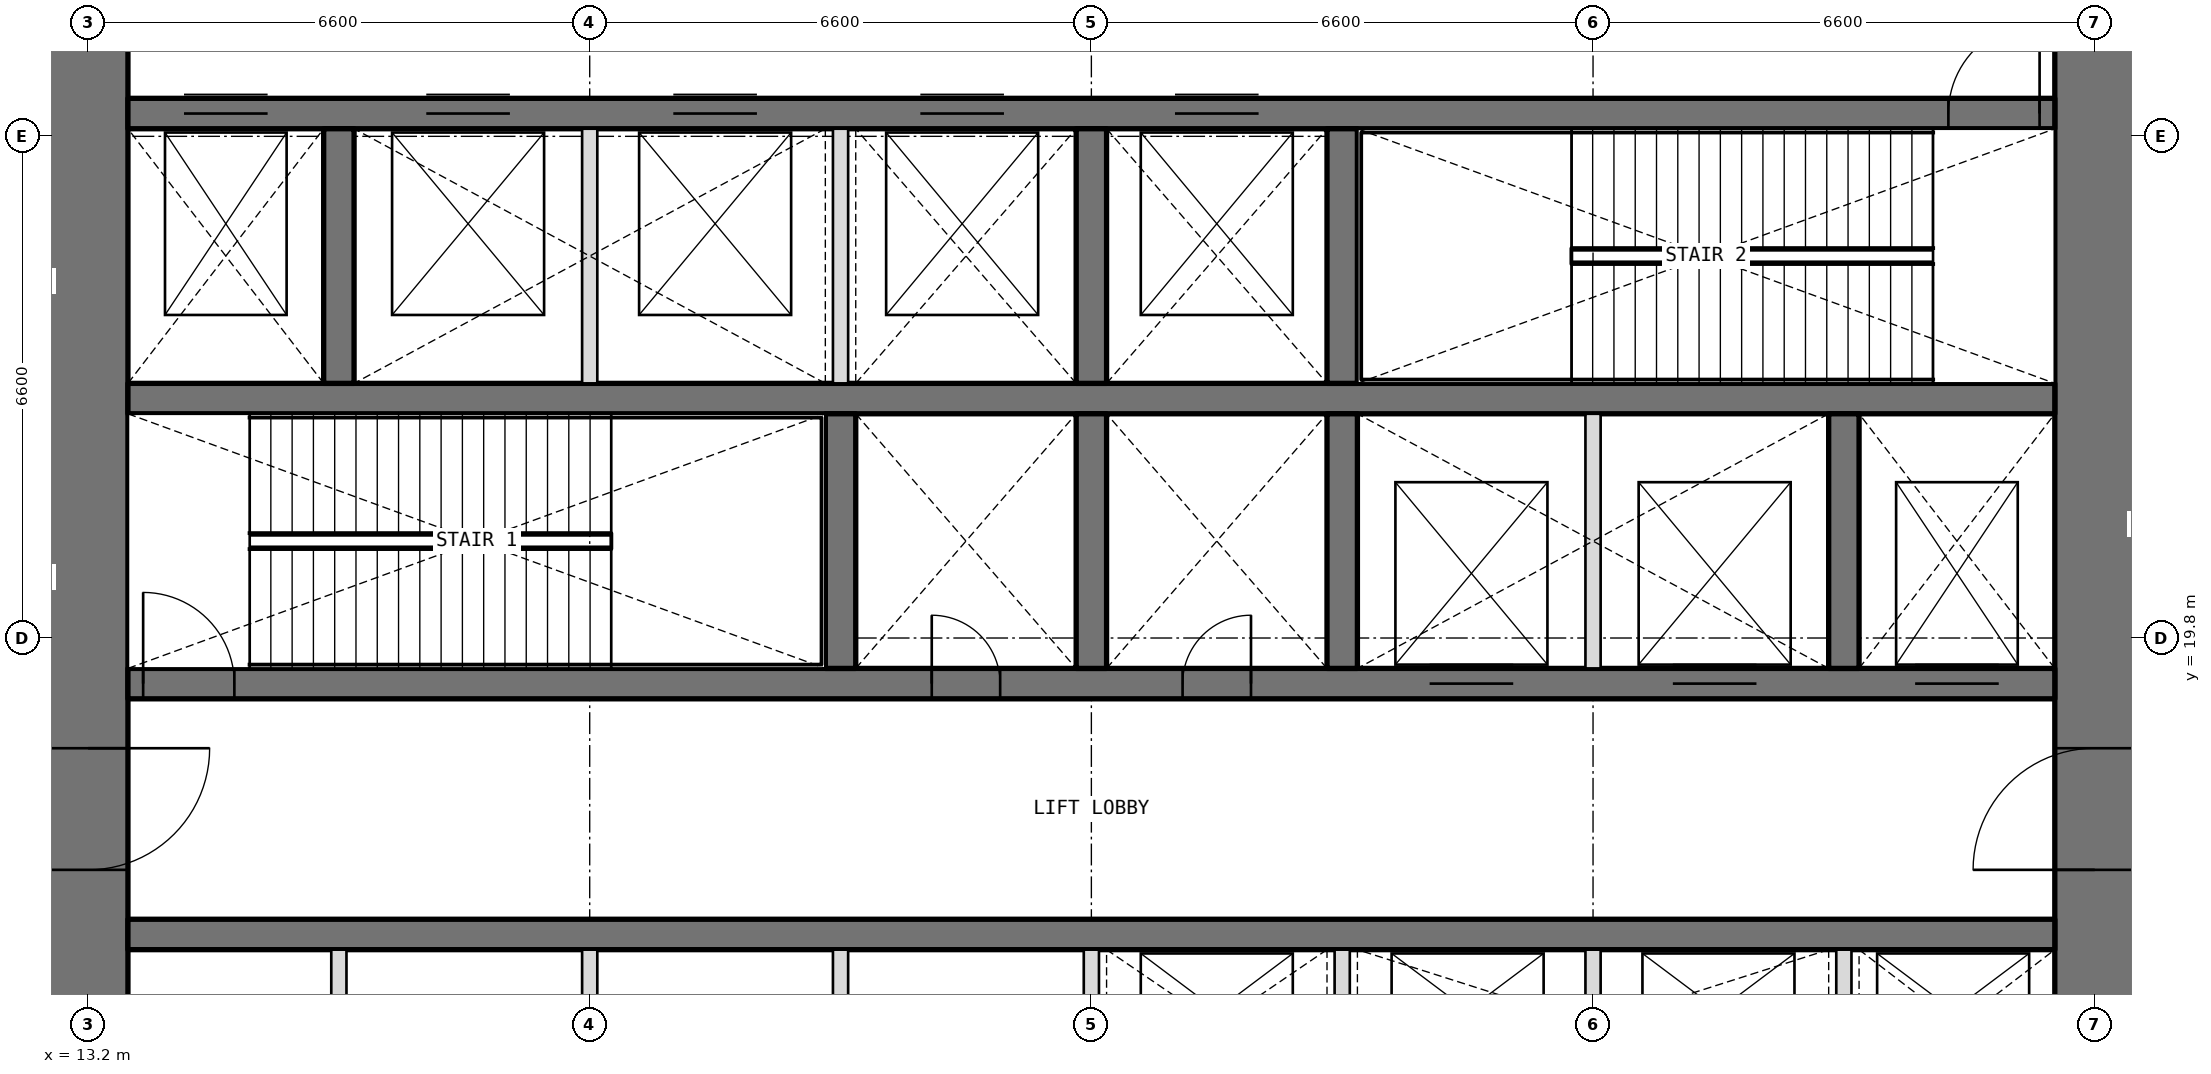
"""IFC4 building model, lengths in metres.
Left out: names, types, materials, properties, quantities, classifications, styles, units other than length and angle.
Written with IfcOpenShell. Run it as: python <this file> out.ifc"""

import sys

from ifc_helpers import new_model, si_unit, direction, frame, frame_2d, origin, place, context, subcontext, project, spatial, rectangle, extrude, element, fill, save


model = new_model("IFC4")
c1 = context("Model", 3, precision=1e-05, world=origin(), true_north=direction((0.0, 1.0)))
c2 = subcontext(c1, "Body", "Model", "MODEL_VIEW")
j1 = project(units=[si_unit("LENGTHUNIT", "METRE"), si_unit("PLANEANGLEUNIT", "RADIAN")], contexts=[c1])
p1 = place(None, origin())
s1 = spatial("IfcSite", under=j1, at=p1, CompositionType="ELEMENT")
p2 = place(p1, origin())
s2 = spatial("IfcBuilding", under=s1, at=p2, CompositionType="ELEMENT")
p3 = place(p2, frame((0.0, 0.0, 75.9)))
s3 = spatial("IfcBuildingStorey", under=s2, at=p3, CompositionType="ELEMENT", Elevation=75.9)
p4 = place(p3, frame((39.6, 13.725, 0.0), z_axis=(0.0, 0.0, 1.0), x_axis=(0.0, 1.0, 0.0)))
e1 = element("IfcWall", 1, at=p4, inside=s3, PredefinedType="SHEAR", context=c2, shape_type="SweptSolid", body=[
    extrude(rectangle(XDim=18.75, YDim=1.05, at=frame_2d((9.375, 0.0))), origin(), (0.0, 0.0, 1.0), 6.3),
])
p5 = place(p4, frame((3.025, 0.0, 0.0)))
e2 = element("IfcOpeningElement", 2, at=p5, cuts=e1, PredefinedType="OPENING", context=c2, shape_type="SweptSolid", body=[
    extrude(rectangle(XDim=1.6, YDim=2.1, at=frame_2d((0.8, 1.05))), frame((0.0, 0.535, 0.0), z_axis=(0.0, -1.0, 0.0), x_axis=(1.0, 0.0, 0.0)), (0.0, 0.0, 1.0), 1.07),
])
p6 = place(p4, frame((13.825, 0.0, 0.0)))
e3 = element("IfcOpeningElement", 3, at=p6, cuts=e1, PredefinedType="OPENING", context=c2, shape_type="SweptSolid", body=[
    extrude(rectangle(XDim=1.6, YDim=2.1, at=frame_2d((0.8, 1.05))), frame((0.0, 0.535, 0.0), z_axis=(0.0, -1.0, 0.0), x_axis=(1.0, 0.0, 0.0)), (0.0, 0.0, 1.0), 1.07),
])
p7 = place(p3, frame((13.2, 32.475, 0.0), z_axis=(0.0, 0.0, 1.0), x_axis=(0.0, -1.0, 0.0)))
e4 = element("IfcWall", 4, at=p7, inside=s3, PredefinedType="SHEAR", context=c2, shape_type="SweptSolid", body=[
    extrude(rectangle(XDim=18.75, YDim=1.05, at=frame_2d((9.375, 0.0))), origin(), (0.0, 0.0, 1.0), 6.3),
])
p8 = place(p7, frame((14.125, 0.0, 0.0)))
e5 = element("IfcOpeningElement", 5, at=p8, cuts=e4, PredefinedType="OPENING", context=c2, shape_type="SweptSolid", body=[
    extrude(rectangle(XDim=1.6, YDim=2.1, at=frame_2d((0.8, 1.05))), frame((0.0, 0.535, 0.0), z_axis=(0.0, -1.0, 0.0), x_axis=(1.0, 0.0, 0.0)), (0.0, 0.0, 1.0), 1.07),
])
p9 = place(p7, frame((3.325, 0.0, 0.0)))
e6 = element("IfcOpeningElement", 6, at=p9, cuts=e4, PredefinedType="OPENING", context=c2, shape_type="SweptSolid", body=[
    extrude(rectangle(XDim=1.6, YDim=2.1, at=frame_2d((0.8, 1.05))), frame((0.0, 0.535, 0.0), z_axis=(0.0, -1.0, 0.0), x_axis=(1.0, 0.0, 0.0)), (0.0, 0.0, 1.0), 1.07),
])
p10 = place(p3, frame((13.725, 15.9, 0.0), z_axis=(0.0, 0.0, 1.0), x_axis=(1.0, 0.0, 0.0)))
e7 = element("IfcWall", 7, at=p10, inside=s3, PredefinedType="SHEAR", context=c2, shape_type="SweptSolid", body=[
    extrude(rectangle(XDim=25.35, YDim=0.4, at=frame_2d((12.675, 0.0))), origin(), (0.0, 0.0, 1.0), 6.3),
])
p11 = place(p3, frame((13.725, 19.2, 0.0), z_axis=(0.0, 0.0, 1.0), x_axis=(1.0, 0.0, 0.0)))
e8 = element("IfcWall", 8, at=p11, inside=s3, PredefinedType="SHEAR", context=c2, shape_type="SweptSolid", body=[
    extrude(rectangle(XDim=25.35, YDim=0.4, at=frame_2d((12.675, 0.0))), origin(), (0.0, 0.0, 1.0), 6.3),
])
p12 = place(p11, frame((10.575, 0.0, 0.0)))
e9 = element("IfcOpeningElement", 9, at=p12, cuts=e8, PredefinedType="OPENING", context=c2, shape_type="SweptSolid", body=[
    extrude(rectangle(XDim=0.9, YDim=2.1, at=frame_2d((0.45, 1.05))), frame((0.0, 0.21, 0.0), z_axis=(0.0, -1.0, 0.0), x_axis=(1.0, 0.0, 0.0)), (0.0, 0.0, 1.0), 0.42),
])
p13 = place(p11, frame((13.875, 0.0, 0.0)))
e10 = element("IfcOpeningElement", 10, at=p13, cuts=e8, PredefinedType="OPENING", context=c2, shape_type="SweptSolid", body=[
    extrude(rectangle(XDim=0.9, YDim=2.1, at=frame_2d((0.45, 1.05))), frame((0.0, 0.21, 0.0), z_axis=(0.0, -1.0, 0.0), x_axis=(1.0, 0.0, 0.0)), (0.0, 0.0, 1.0), 0.42),
])
p14 = place(p11, frame((0.2, 0.0, 0.0)))
e11 = element("IfcOpeningElement", 11, at=p14, cuts=e8, PredefinedType="OPENING", context=c2, shape_type="SweptSolid", body=[
    extrude(rectangle(XDim=1.2, YDim=2.1, at=frame_2d((0.6, 1.05))), frame((0.0, 0.21, 0.0), z_axis=(0.0, -1.0, 0.0), x_axis=(1.0, 0.0, 0.0)), (0.0, 0.0, 1.0), 0.42),
])
p15 = place(p11, frame((23.512, 0.0, 0.0)))
e12 = element("IfcOpeningElement", 12, at=p15, cuts=e8, PredefinedType="OPENING", context=c2, shape_type="SweptSolid", body=[
    extrude(rectangle(XDim=1.1, YDim=2.1, at=frame_2d((0.55, 1.05))), frame((0.0, 0.21, 0.0), z_axis=(0.0, -1.0, 0.0), x_axis=(1.0, 0.0, 0.0)), (0.0, 0.0, 1.0), 0.42),
])
p16 = place(p11, frame((17.125, 0.0, 0.0)))
e13 = element("IfcOpeningElement", 13, at=p16, cuts=e8, PredefinedType="OPENING", context=c2, shape_type="SweptSolid", body=[
    extrude(rectangle(XDim=1.1, YDim=2.1, at=frame_2d((0.55, 1.05))), frame((0.0, 0.21, 0.0), z_axis=(0.0, -1.0, 0.0), x_axis=(1.0, 0.0, 0.0)), (0.0, 0.0, 1.0), 0.42),
])
p17 = place(p11, frame((20.325, 0.0, 0.0)))
e14 = element("IfcOpeningElement", 14, at=p17, cuts=e8, PredefinedType="OPENING", context=c2, shape_type="SweptSolid", body=[
    extrude(rectangle(XDim=1.1, YDim=2.1, at=frame_2d((0.55, 1.05))), frame((0.0, 0.21, 0.0), z_axis=(0.0, -1.0, 0.0), x_axis=(1.0, 0.0, 0.0)), (0.0, 0.0, 1.0), 0.42),
])
p18 = place(p3, frame((13.725, 22.95, 0.0), z_axis=(0.0, 0.0, 1.0), x_axis=(1.0, 0.0, 0.0)))
e15 = element("IfcWall", 15, at=p18, inside=s3, PredefinedType="SHEAR", context=c2, shape_type="SweptSolid", body=[
    extrude(rectangle(XDim=25.35, YDim=0.4, at=frame_2d((12.675, 0.0))), origin(), (0.0, 0.0, 1.0), 6.3),
])
p19 = place(p3, frame((13.725, 26.7, 0.0), z_axis=(0.0, 0.0, 1.0), x_axis=(1.0, 0.0, 0.0)))
e16 = element("IfcWall", 16, at=p19, inside=s3, PredefinedType="SHEAR", context=c2, shape_type="SweptSolid", body=[
    extrude(rectangle(XDim=25.35, YDim=0.4, at=frame_2d((12.675, 0.0))), origin(), (0.0, 0.0, 1.0), 6.3),
])
p20 = place(p19, frame((23.95, 0.0, 0.0)))
e17 = element("IfcOpeningElement", 17, at=p20, cuts=e16, PredefinedType="OPENING", context=c2, shape_type="SweptSolid", body=[
    extrude(rectangle(XDim=1.2, YDim=2.1, at=frame_2d((0.6, 1.05))), frame((0.0, 0.21, 0.0), z_axis=(0.0, -1.0, 0.0), x_axis=(1.0, 0.0, 0.0)), (0.0, 0.0, 1.0), 0.42),
])
p21 = place(p19, frame((0.738, 0.0, 0.0)))
e18 = element("IfcOpeningElement", 18, at=p21, cuts=e16, PredefinedType="OPENING", context=c2, shape_type="SweptSolid", body=[
    extrude(rectangle(XDim=1.1, YDim=2.1, at=frame_2d((0.55, 1.05))), frame((0.0, 0.21, 0.0), z_axis=(0.0, -1.0, 0.0), x_axis=(1.0, 0.0, 0.0)), (0.0, 0.0, 1.0), 0.42),
])
p22 = place(p19, frame((3.925, 0.0, 0.0)))
e19 = element("IfcOpeningElement", 19, at=p22, cuts=e16, PredefinedType="OPENING", context=c2, shape_type="SweptSolid", body=[
    extrude(rectangle(XDim=1.1, YDim=2.1, at=frame_2d((0.55, 1.05))), frame((0.0, 0.21, 0.0), z_axis=(0.0, -1.0, 0.0), x_axis=(1.0, 0.0, 0.0)), (0.0, 0.0, 1.0), 0.42),
])
p23 = place(p19, frame((7.175, 0.0, 0.0)))
e20 = element("IfcOpeningElement", 20, at=p23, cuts=e16, PredefinedType="OPENING", context=c2, shape_type="SweptSolid", body=[
    extrude(rectangle(XDim=1.1, YDim=2.1, at=frame_2d((0.55, 1.05))), frame((0.0, 0.21, 0.0), z_axis=(0.0, -1.0, 0.0), x_axis=(1.0, 0.0, 0.0)), (0.0, 0.0, 1.0), 0.42),
])
p24 = place(p19, frame((10.425, 0.0, 0.0)))
e21 = element("IfcOpeningElement", 21, at=p24, cuts=e16, PredefinedType="OPENING", context=c2, shape_type="SweptSolid", body=[
    extrude(rectangle(XDim=1.1, YDim=2.1, at=frame_2d((0.55, 1.05))), frame((0.0, 0.21, 0.0), z_axis=(0.0, -1.0, 0.0), x_axis=(1.0, 0.0, 0.0)), (0.0, 0.0, 1.0), 0.42),
])
p25 = place(p19, frame((13.775, 0.0, 0.0)))
e22 = element("IfcOpeningElement", 22, at=p25, cuts=e16, PredefinedType="OPENING", context=c2, shape_type="SweptSolid", body=[
    extrude(rectangle(XDim=1.1, YDim=2.1, at=frame_2d((0.55, 1.05))), frame((0.0, 0.21, 0.0), z_axis=(0.0, -1.0, 0.0), x_axis=(1.0, 0.0, 0.0)), (0.0, 0.0, 1.0), 0.42),
])
for number, where, z_axis, x_axis in (
    (23, (23.1, 19.4, 0.0), (0.0, 0.0, 1.0), (0.0, 1.0, 0.0)),
    (24, (26.4, 19.4, 0.0), (0.0, 0.0, 1.0), (0.0, 1.0, 0.0)),
    (25, (29.7, 19.4, 0.0), (0.0, 0.0, 1.0), (0.0, 1.0, 0.0)),
    (26, (36.3, 19.4, 0.0), (0.0, 0.0, 1.0), (0.0, 1.0, 0.0)),
    (27, (16.5, 23.15, 0.0), (0.0, 0.0, 1.0), (0.0, 1.0, 0.0)),
    (28, (26.4, 23.15, 0.0), (0.0, 0.0, 1.0), (0.0, 1.0, 0.0)),
    (29, (29.7, 23.15, 0.0), (0.0, 0.0, 1.0), (0.0, 1.0, 0.0)),
):
    element("IfcWall", number, at=place(p3, frame(where, z_axis=z_axis, x_axis=x_axis)), inside=s3, PredefinedType="SHEAR", context=c2, shape_type="SweptSolid", body=[
        extrude(rectangle(XDim=3.35, YDim=0.4, at=frame_2d((1.675, 0.0))), origin(), (0.0, 0.0, 1.0), 6.3),
    ])
for number, where, z_axis, x_axis in (
    (30, (16.5, 13.725, 0.0), (0.0, 0.0, 1.0), (0.0, 1.0, 0.0)),
    (31, (19.8, 13.725, 0.0), (0.0, 0.0, 1.0), (0.0, 1.0, 0.0)),
    (32, (23.1, 13.725, 0.0), (0.0, 0.0, 1.0), (0.0, 1.0, 0.0)),
    (33, (26.4, 13.725, 0.0), (0.0, 0.0, 1.0), (0.0, 1.0, 0.0)),
    (34, (29.7, 13.725, 0.0), (0.0, 0.0, 1.0), (0.0, 1.0, 0.0)),
    (35, (33.0, 13.725, 0.0), (0.0, 0.0, 1.0), (0.0, 1.0, 0.0)),
    (36, (36.3, 13.725, 0.0), (0.0, 0.0, 1.0), (0.0, 1.0, 0.0)),
):
    element("IfcWall", number, at=place(p3, frame(where, z_axis=z_axis, x_axis=x_axis)), inside=s3, PredefinedType="PARTITIONING", context=c2, shape_type="SweptSolid", body=[
        extrude(rectangle(XDim=1.975, YDim=0.2, at=frame_2d((0.987, 0.0))), origin(), (0.0, 0.0, 1.0), 6.3),
    ])
for number, where, z_axis, x_axis in (
    (37, (33.0, 19.4, 0.0), (0.0, 0.0, 1.0), (0.0, 1.0, 0.0)),
    (38, (19.8, 23.15, 0.0), (0.0, 0.0, 1.0), (0.0, 1.0, 0.0)),
    (39, (23.1, 23.15, 0.0), (0.0, 0.0, 1.0), (0.0, 1.0, 0.0)),
):
    element("IfcWall", number, at=place(p3, frame(where, z_axis=z_axis, x_axis=x_axis)), inside=s3, PredefinedType="PARTITIONING", context=c2, shape_type="SweptSolid", body=[
        extrude(rectangle(XDim=3.35, YDim=0.2, at=frame_2d((1.675, 0.0))), origin(), (0.0, 0.0, 1.0), 6.3),
    ])
p26 = place(p12, origin())
e40 = element("IfcDoor", 40, at=p26, inside=s3, OperationType="SINGLE_SWING_LEFT", PredefinedType="DOOR", context=c2, shape_type="SweptSolid", body=[
    extrude(rectangle(XDim=0.9, YDim=2.1, at=frame_2d((0.45, 1.05))), frame((0.0, 0.025, 0.0), z_axis=(0.0, -1.0, 0.0), x_axis=(1.0, 0.0, 0.0)), (0.0, 0.0, 1.0), 0.05),
])
fill(e9, e40)
p27 = place(p13, origin())
e41 = element("IfcDoor", 41, at=p27, inside=s3, OperationType="SINGLE_SWING_RIGHT", PredefinedType="DOOR", context=c2, shape_type="SweptSolid", body=[
    extrude(rectangle(XDim=0.9, YDim=2.1, at=frame_2d((0.45, 1.05))), frame((0.0, 0.025, 0.0), z_axis=(0.0, -1.0, 0.0), x_axis=(1.0, 0.0, 0.0)), (0.0, 0.0, 1.0), 0.05),
])
fill(e10, e41)
p28 = place(p14, origin())
e42 = element("IfcDoor", 42, at=p28, inside=s3, OperationType="SINGLE_SWING_LEFT", PredefinedType="DOOR", context=c2, shape_type="SweptSolid", body=[
    extrude(rectangle(XDim=1.2, YDim=2.1, at=frame_2d((0.6, 1.05))), frame((0.0, 0.025, 0.0), z_axis=(0.0, -1.0, 0.0), x_axis=(1.0, 0.0, 0.0)), (0.0, 0.0, 1.0), 0.05),
])
fill(e11, e42)
p29 = place(p20, origin())
e43 = element("IfcDoor", 43, at=p29, inside=s3, OperationType="SINGLE_SWING_RIGHT", PredefinedType="DOOR", context=c2, shape_type="SweptSolid", body=[
    extrude(rectangle(XDim=1.2, YDim=2.1, at=frame_2d((0.6, 1.05))), frame((0.0, 0.025, 0.0), z_axis=(0.0, -1.0, 0.0), x_axis=(1.0, 0.0, 0.0)), (0.0, 0.0, 1.0), 0.05),
])
fill(e17, e43)
p30 = place(p8, origin())
e44 = element("IfcDoor", 44, at=p30, inside=s3, OperationType="DOUBLE_DOOR_DOUBLE_SWING", PredefinedType="DOOR", context=c2, shape_type="SweptSolid", body=[
    extrude(rectangle(XDim=1.6, YDim=2.1, at=frame_2d((0.8, 1.05))), frame((0.0, 0.025, 0.0), z_axis=(0.0, -1.0, 0.0), x_axis=(1.0, 0.0, 0.0)), (0.0, 0.0, 1.0), 0.05),
])
fill(e5, e44)
p31 = place(p5, origin())
e45 = element("IfcDoor", 45, at=p31, inside=s3, OperationType="DOUBLE_DOOR_DOUBLE_SWING", PredefinedType="DOOR", context=c2, shape_type="SweptSolid", body=[
    extrude(rectangle(XDim=1.6, YDim=2.1, at=frame_2d((0.8, 1.05))), frame((0.0, 0.025, 0.0), z_axis=(0.0, -1.0, 0.0), x_axis=(1.0, 0.0, 0.0)), (0.0, 0.0, 1.0), 0.05),
])
fill(e2, e45)
p32 = place(p21, origin())
e46 = element("IfcDoor", 46, at=p32, inside=s3, OperationType="DOUBLE_DOOR_SLIDING", PredefinedType="DOOR", context=c2, shape_type="SweptSolid", body=[
    extrude(rectangle(XDim=1.1, YDim=2.1, at=frame_2d((0.55, 1.05))), frame((0.0, 0.025, 0.0), z_axis=(0.0, -1.0, 0.0), x_axis=(1.0, 0.0, 0.0)), (0.0, 0.0, 1.0), 0.05),
])
fill(e18, e46)
p33 = place(p15, origin())
e47 = element("IfcDoor", 47, at=p33, inside=s3, OperationType="DOUBLE_DOOR_SLIDING", PredefinedType="DOOR", context=c2, shape_type="SweptSolid", body=[
    extrude(rectangle(XDim=1.1, YDim=2.1, at=frame_2d((0.55, 1.05))), frame((0.0, 0.025, 0.0), z_axis=(0.0, -1.0, 0.0), x_axis=(1.0, 0.0, 0.0)), (0.0, 0.0, 1.0), 0.05),
])
fill(e12, e47)
p34 = place(p16, origin())
e48 = element("IfcDoor", 48, at=p34, inside=s3, OperationType="DOUBLE_DOOR_SLIDING", PredefinedType="DOOR", context=c2, shape_type="SweptSolid", body=[
    extrude(rectangle(XDim=1.1, YDim=2.1, at=frame_2d((0.55, 1.05))), frame((0.0, 0.025, 0.0), z_axis=(0.0, -1.0, 0.0), x_axis=(1.0, 0.0, 0.0)), (0.0, 0.0, 1.0), 0.05),
])
fill(e13, e48)
p35 = place(p17, origin())
e49 = element("IfcDoor", 49, at=p35, inside=s3, OperationType="DOUBLE_DOOR_SLIDING", PredefinedType="DOOR", context=c2, shape_type="SweptSolid", body=[
    extrude(rectangle(XDim=1.1, YDim=2.1, at=frame_2d((0.55, 1.05))), frame((0.0, 0.025, 0.0), z_axis=(0.0, -1.0, 0.0), x_axis=(1.0, 0.0, 0.0)), (0.0, 0.0, 1.0), 0.05),
])
fill(e14, e49)
p36 = place(p22, origin())
e50 = element("IfcDoor", 50, at=p36, inside=s3, OperationType="DOUBLE_DOOR_SLIDING", PredefinedType="DOOR", context=c2, shape_type="SweptSolid", body=[
    extrude(rectangle(XDim=1.1, YDim=2.1, at=frame_2d((0.55, 1.05))), frame((0.0, 0.025, 0.0), z_axis=(0.0, -1.0, 0.0), x_axis=(1.0, 0.0, 0.0)), (0.0, 0.0, 1.0), 0.05),
])
fill(e19, e50)
p37 = place(p23, origin())
e51 = element("IfcDoor", 51, at=p37, inside=s3, OperationType="DOUBLE_DOOR_SLIDING", PredefinedType="DOOR", context=c2, shape_type="SweptSolid", body=[
    extrude(rectangle(XDim=1.1, YDim=2.1, at=frame_2d((0.55, 1.05))), frame((0.0, 0.025, 0.0), z_axis=(0.0, -1.0, 0.0), x_axis=(1.0, 0.0, 0.0)), (0.0, 0.0, 1.0), 0.05),
])
fill(e20, e51)
p38 = place(p24, origin())
e52 = element("IfcDoor", 52, at=p38, inside=s3, OperationType="DOUBLE_DOOR_SLIDING", PredefinedType="DOOR", context=c2, shape_type="SweptSolid", body=[
    extrude(rectangle(XDim=1.1, YDim=2.1, at=frame_2d((0.55, 1.05))), frame((0.0, 0.025, 0.0), z_axis=(0.0, -1.0, 0.0), x_axis=(1.0, 0.0, 0.0)), (0.0, 0.0, 1.0), 0.05),
])
fill(e21, e52)
p39 = place(p25, origin())
e53 = element("IfcDoor", 53, at=p39, inside=s3, OperationType="DOUBLE_DOOR_SLIDING", PredefinedType="DOOR", context=c2, shape_type="SweptSolid", body=[
    extrude(rectangle(XDim=1.1, YDim=2.1, at=frame_2d((0.55, 1.05))), frame((0.0, 0.025, 0.0), z_axis=(0.0, -1.0, 0.0), x_axis=(1.0, 0.0, 0.0)), (0.0, 0.0, 1.0), 0.05),
])
fill(e22, e53)
save(model, sys.argv[1])
